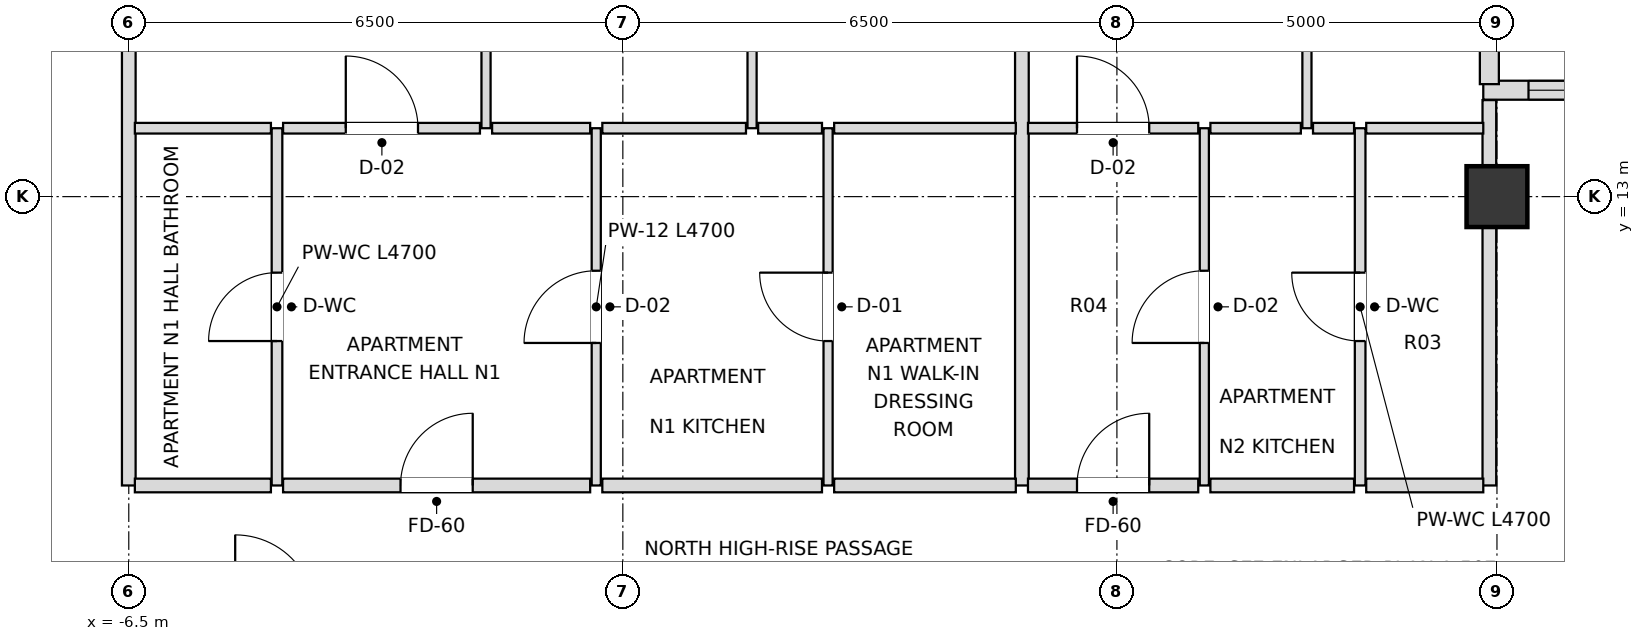
"""IFC4 building model, lengths in metres.
Left out: names, types, materials, properties, quantities, classifications, styles, units other than length and angle.
Written with IfcOpenShell. Run it as: python <this file> out.ifc"""

import sys

from ifc_helpers import new_model, si_unit, direction, frame, frame_2d, origin, origin_2d, place, context, subcontext, project, spatial, rectangle, extrude, element, fill, save


model = new_model("IFC4")
c1 = context("Model", 3, precision=1e-05, world=origin(), true_north=direction((0.0, 1.0)))
c2 = subcontext(c1, "Body", "Model", "MODEL_VIEW")
j1 = project(units=[si_unit("LENGTHUNIT", "METRE"), si_unit("PLANEANGLEUNIT", "RADIAN")], contexts=[c1])
p1 = place(None, origin())
s1 = spatial("IfcSite", under=j1, at=p1, CompositionType="ELEMENT")
p2 = place(p1, origin())
s2 = spatial("IfcBuilding", under=s1, at=p2, CompositionType="ELEMENT")
p3 = place(p2, frame((0.0, 0.0, 279.9)))
s3 = spatial("IfcBuildingStorey", under=s2, at=p3, CompositionType="ELEMENT", Elevation=279.9)
p4 = place(p3, frame((11.5, 13.0, 0.0), z_axis=(0.0, 0.0, 1.0), x_axis=(1.0, 0.0, 0.0)))
e1 = element("IfcColumn", 1, at=p4, inside=s3, PredefinedType="COLUMN", context=c2, shape_type="SweptSolid", body=[
    extrude(rectangle(XDim=0.8, YDim=0.8, at=origin_2d()), origin(), (0.0, 0.0, 1.0), 3.6),
])
p5 = place(p3, frame((16.98, 14.4, 0.0), z_axis=(0.0, 0.0, 1.0), x_axis=(-1.0, 0.0, 0.0)))
e2 = element("IfcWall", 2, at=p5, inside=s3, PredefinedType="SOLIDWALL", context=c2, shape_type="SweptSolid", body=[
    extrude(rectangle(XDim=5.66, YDim=0.25, at=frame_2d((2.83, 0.0))), origin(), (0.0, 0.0, 1.0), 2.748),
])
p6 = place(p5, frame((0.595, 0.0, 0.72)))
e3 = element("IfcOpeningElement", 3, at=p6, cuts=e2, PredefinedType="OPENING", context=c2, shape_type="SweptSolid", body=[
    extrude(rectangle(XDim=1.8, YDim=1.68, at=frame_2d((0.9, 0.84))), frame((0.0, 0.135, 0.0), z_axis=(0.0, -1.0, 0.0), x_axis=(1.0, 0.0, 0.0)), (0.0, 0.0, 1.0), 0.27),
])
p7 = place(p5, frame((3.265, 0.0, 0.72)))
e4 = element("IfcOpeningElement", 4, at=p7, cuts=e2, PredefinedType="OPENING", context=c2, shape_type="SweptSolid", body=[
    extrude(rectangle(XDim=1.8, YDim=1.68, at=frame_2d((0.9, 0.84))), frame((0.0, 0.135, 0.0), z_axis=(0.0, -1.0, 0.0), x_axis=(1.0, 0.0, 0.0)), (0.0, 0.0, 1.0), 0.27),
])
p8 = place(p3, frame((11.4, 14.48, 0.0), z_axis=(0.0, 0.0, 1.0), x_axis=(0.0, 1.0, 0.0)))
e5 = element("IfcWall", 5, at=p8, inside=s3, PredefinedType="SOLIDWALL", context=c2, shape_type="SweptSolid", body=[
    extrude(rectangle(XDim=5.34, YDim=0.25, at=frame_2d((2.67, 0.0))), origin(), (0.0, 0.0, 1.0), 2.748),
])
p9 = place(p8, frame((1.615, 0.0, 0.72)))
e6 = element("IfcOpeningElement", 6, at=p9, cuts=e5, PredefinedType="OPENING", context=c2, shape_type="SweptSolid", body=[
    extrude(rectangle(XDim=1.8, YDim=1.68, at=frame_2d((0.9, 0.84))), frame((0.0, 0.135, 0.0), z_axis=(0.0, -1.0, 0.0), x_axis=(1.0, 0.0, 0.0)), (0.0, 0.0, 1.0), 0.27),
])
p10 = place(p3, frame((-6.5, 9.2, 0.0), z_axis=(0.0, 0.0, 1.0), x_axis=(0.0, 1.0, 0.0)))
e7 = element("IfcWall", 7, at=p10, inside=s3, PredefinedType="PARTITIONING", context=c2, shape_type="SweptSolid", body=[
    extrude(rectangle(XDim=10.7, YDim=0.18, at=frame_2d((5.35, 0.0))), origin(), (0.0, 0.0, 1.0), 2.826),
])
p11 = place(p3, frame((-4.55, 9.2, 0.0), z_axis=(0.0, 0.0, 1.0), x_axis=(0.0, 1.0, 0.0)))
e8 = element("IfcWall", 8, at=p11, inside=s3, PredefinedType="PARTITIONING", context=c2, shape_type="SweptSolid", body=[
    extrude(rectangle(XDim=4.7, YDim=0.14, at=frame_2d((2.35, 0.0))), origin(), (0.0, 0.0, 1.0), 3.38),
])
p12 = place(p11, frame((1.9, 0.0, 0.0)))
e9 = element("IfcOpeningElement", 9, at=p12, cuts=e8, PredefinedType="OPENING", context=c2, shape_type="SweptSolid", body=[
    extrude(rectangle(XDim=0.9, YDim=2.1, at=frame_2d((0.45, 1.05))), frame((0.0, 0.08, 0.0), z_axis=(0.0, -1.0, 0.0), x_axis=(1.0, 0.0, 0.0)), (0.0, 0.0, 1.0), 0.16),
])
p13 = place(p3, frame((-1.8, 13.9, 0.0), z_axis=(0.0, 0.0, 1.0), x_axis=(0.0, 1.0, 0.0)))
e10 = element("IfcWall", 10, at=p13, inside=s3, PredefinedType="PARTITIONING", context=c2, shape_type="SweptSolid", body=[
    extrude(rectangle(XDim=6.0, YDim=0.12, at=frame_2d((3.0, 0.0))), origin(), (0.0, 0.0, 1.0), 3.018),
])
p14 = place(p13, frame((2.55, 0.0, 0.0)))
e11 = element("IfcOpeningElement", 11, at=p14, cuts=e10, PredefinedType="OPENING", context=c2, shape_type="SweptSolid", body=[
    extrude(rectangle(XDim=0.9, YDim=2.1, at=frame_2d((0.45, 1.05))), frame((0.0, 0.07, 0.0), z_axis=(0.0, -1.0, 0.0), x_axis=(1.0, 0.0, 0.0)), (0.0, 0.0, 1.0), 0.14),
])
p15 = place(p3, frame((-0.35, 9.2, 0.0), z_axis=(0.0, 0.0, 1.0), x_axis=(0.0, 1.0, 0.0)))
e12 = element("IfcWall", 12, at=p15, inside=s3, PredefinedType="PARTITIONING", context=c2, shape_type="SweptSolid", body=[
    extrude(rectangle(XDim=4.7, YDim=0.12, at=frame_2d((2.35, 0.0))), origin(), (0.0, 0.0, 1.0), 3.38),
])
p16 = place(p15, frame((1.875, 0.0, 0.0)))
e13 = element("IfcOpeningElement", 13, at=p16, cuts=e12, PredefinedType="OPENING", context=c2, shape_type="SweptSolid", body=[
    extrude(rectangle(XDim=0.95, YDim=2.1, at=frame_2d((0.475, 1.05))), frame((0.0, 0.07, 0.0), z_axis=(0.0, -1.0, 0.0), x_axis=(1.0, 0.0, 0.0)), (0.0, 0.0, 1.0), 0.14),
])
p17 = place(p3, frame((1.7, 13.9, 0.0), z_axis=(0.0, 0.0, 1.0), x_axis=(0.0, 1.0, 0.0)))
e14 = element("IfcWall", 14, at=p17, inside=s3, PredefinedType="PARTITIONING", context=c2, shape_type="SweptSolid", body=[
    extrude(rectangle(XDim=6.0, YDim=0.12, at=frame_2d((3.0, 0.0))), origin(), (0.0, 0.0, 1.0), 3.018),
])
p18 = place(p17, frame((2.55, 0.0, 0.0)))
e15 = element("IfcOpeningElement", 15, at=p18, cuts=e14, PredefinedType="OPENING", context=c2, shape_type="SweptSolid", body=[
    extrude(rectangle(XDim=0.9, YDim=2.1, at=frame_2d((0.45, 1.05))), frame((0.0, 0.07, 0.0), z_axis=(0.0, -1.0, 0.0), x_axis=(1.0, 0.0, 0.0)), (0.0, 0.0, 1.0), 0.14),
])
p19 = place(p3, frame((2.7, 9.2, 0.0), z_axis=(0.0, 0.0, 1.0), x_axis=(0.0, 1.0, 0.0)))
e16 = element("IfcWall", 16, at=p19, inside=s3, PredefinedType="PARTITIONING", context=c2, shape_type="SweptSolid", body=[
    extrude(rectangle(XDim=4.7, YDim=0.12, at=frame_2d((2.35, 0.0))), origin(), (0.0, 0.0, 1.0), 3.38),
])
p20 = place(p19, frame((1.9, 0.0, 0.0)))
e17 = element("IfcOpeningElement", 17, at=p20, cuts=e16, PredefinedType="OPENING", context=c2, shape_type="SweptSolid", body=[
    extrude(rectangle(XDim=0.9, YDim=2.1, at=frame_2d((0.45, 1.05))), frame((0.0, 0.07, 0.0), z_axis=(0.0, -1.0, 0.0), x_axis=(1.0, 0.0, 0.0)), (0.0, 0.0, 1.0), 0.14),
])
p21 = place(p3, frame((5.25, 9.2, 0.0), z_axis=(0.0, 0.0, 1.0), x_axis=(0.0, 1.0, 0.0)))
e18 = element("IfcWall", 18, at=p21, inside=s3, PredefinedType="PARTITIONING", context=c2, shape_type="SweptSolid", body=[
    extrude(rectangle(XDim=10.7, YDim=0.18, at=frame_2d((5.35, 0.0))), origin(), (0.0, 0.0, 1.0), 3.018),
])
p22 = place(p3, frame((7.65, 9.2, 0.0), z_axis=(0.0, 0.0, 1.0), x_axis=(0.0, 1.0, 0.0)))
e19 = element("IfcWall", 19, at=p22, inside=s3, PredefinedType="PARTITIONING", context=c2, shape_type="SweptSolid", body=[
    extrude(rectangle(XDim=4.7, YDim=0.12, at=frame_2d((2.35, 0.0))), origin(), (0.0, 0.0, 1.0), 2.826),
])
p23 = place(p22, frame((1.875, 0.0, 0.0)))
e20 = element("IfcOpeningElement", 20, at=p23, cuts=e19, PredefinedType="OPENING", context=c2, shape_type="SweptSolid", body=[
    extrude(rectangle(XDim=0.95, YDim=2.1, at=frame_2d((0.475, 1.05))), frame((0.0, 0.07, 0.0), z_axis=(0.0, -1.0, 0.0), x_axis=(1.0, 0.0, 0.0)), (0.0, 0.0, 1.0), 0.14),
])
p24 = place(p3, frame((9.0, 13.9, 0.0), z_axis=(0.0, 0.0, 1.0), x_axis=(0.0, 1.0, 0.0)))
e21 = element("IfcWall", 21, at=p24, inside=s3, PredefinedType="PARTITIONING", context=c2, shape_type="SweptSolid", body=[
    extrude(rectangle(XDim=6.0, YDim=0.12, at=frame_2d((3.0, 0.0))), origin(), (0.0, 0.0, 1.0), 3.38),
])
p25 = place(p24, frame((2.55, 0.0, 0.0)))
e22 = element("IfcOpeningElement", 22, at=p25, cuts=e21, PredefinedType="OPENING", context=c2, shape_type="SweptSolid", body=[
    extrude(rectangle(XDim=0.9, YDim=2.1, at=frame_2d((0.45, 1.05))), frame((0.0, 0.07, 0.0), z_axis=(0.0, -1.0, 0.0), x_axis=(1.0, 0.0, 0.0)), (0.0, 0.0, 1.0), 0.14),
])
p26 = place(p3, frame((9.7, 9.2, 0.0), z_axis=(0.0, 0.0, 1.0), x_axis=(0.0, 1.0, 0.0)))
e23 = element("IfcWall", 23, at=p26, inside=s3, PredefinedType="PARTITIONING", context=c2, shape_type="SweptSolid", body=[
    extrude(rectangle(XDim=4.7, YDim=0.14, at=frame_2d((2.35, 0.0))), origin(), (0.0, 0.0, 1.0), 2.826),
])
p27 = place(p26, frame((1.9, 0.0, 0.0)))
e24 = element("IfcOpeningElement", 24, at=p27, cuts=e23, PredefinedType="OPENING", context=c2, shape_type="SweptSolid", body=[
    extrude(rectangle(XDim=0.9, YDim=2.1, at=frame_2d((0.45, 1.05))), frame((0.0, 0.08, 0.0), z_axis=(0.0, -1.0, 0.0), x_axis=(1.0, 0.0, 0.0)), (0.0, 0.0, 1.0), 0.16),
])
p28 = place(p3, frame((11.4, 9.2, 0.0), z_axis=(0.0, 0.0, 1.0), x_axis=(0.0, 1.0, 0.0)))
e25 = element("IfcWall", 25, at=p28, inside=s3, PredefinedType="PARTITIONING", context=c2, shape_type="SweptSolid", body=[
    extrude(rectangle(XDim=5.07, YDim=0.18, at=frame_2d((2.535, 0.0))), origin(), (0.0, 0.0, 1.0), 2.748),
])
p29 = place(p3, frame((-6.42, 9.2, 0.0), z_axis=(0.0, 0.0, 1.0), x_axis=(1.0, 0.0, 0.0)))
e26 = element("IfcWall", 26, at=p29, inside=s3, PredefinedType="PARTITIONING", context=c2, shape_type="SweptSolid", body=[
    extrude(rectangle(XDim=1.79, YDim=0.18, at=frame_2d((0.895, 0.0))), origin(), (0.0, 0.0, 1.0), 3.38),
])
p30 = place(p3, frame((-4.47, 9.2, 0.0), z_axis=(0.0, 0.0, 1.0), x_axis=(1.0, 0.0, 0.0)))
e27 = element("IfcWall", 27, at=p30, inside=s3, PredefinedType="PARTITIONING", context=c2, shape_type="SweptSolid", body=[
    extrude(rectangle(XDim=4.04, YDim=0.18, at=frame_2d((2.02, 0.0))), origin(), (0.0, 0.0, 1.0), 3.38),
])
p31 = place(p30, frame((1.545, 0.0, 0.0)))
e28 = element("IfcOpeningElement", 28, at=p31, cuts=e27, PredefinedType="OPENING", context=c2, shape_type="SweptSolid", body=[
    extrude(rectangle(XDim=0.95, YDim=2.15, at=frame_2d((0.475, 1.075))), frame((0.0, 0.1, 0.0), z_axis=(0.0, -1.0, 0.0), x_axis=(1.0, 0.0, 0.0)), (0.0, 0.0, 1.0), 0.2),
])
p32 = place(p3, frame((-0.27, 9.2, 0.0), z_axis=(0.0, 0.0, 1.0), x_axis=(1.0, 0.0, 0.0)))
e29 = element("IfcWall", 29, at=p32, inside=s3, PredefinedType="PARTITIONING", context=c2, shape_type="SweptSolid", body=[
    extrude(rectangle(XDim=2.89, YDim=0.18, at=frame_2d((1.445, 0.0))), origin(), (0.0, 0.0, 1.0), 3.38),
])
p33 = place(p3, frame((2.78, 9.2, 0.0), z_axis=(0.0, 0.0, 1.0), x_axis=(1.0, 0.0, 0.0)))
e30 = element("IfcWall", 30, at=p33, inside=s3, PredefinedType="PARTITIONING", context=c2, shape_type="SweptSolid", body=[
    extrude(rectangle(XDim=2.39, YDim=0.18, at=frame_2d((1.195, 0.0))), origin(), (0.0, 0.0, 1.0), 3.38),
])
p34 = place(p3, frame((5.33, 9.2, 0.0), z_axis=(0.0, 0.0, 1.0), x_axis=(1.0, 0.0, 0.0)))
e31 = element("IfcWall", 31, at=p34, inside=s3, PredefinedType="PARTITIONING", context=c2, shape_type="SweptSolid", body=[
    extrude(rectangle(XDim=2.24, YDim=0.18, at=frame_2d((1.12, 0.0))), origin(), (0.0, 0.0, 1.0), 2.826),
])
p35 = place(p34, frame((0.645, 0.0, 0.0)))
e32 = element("IfcOpeningElement", 32, at=p35, cuts=e31, PredefinedType="OPENING", context=c2, shape_type="SweptSolid", body=[
    extrude(rectangle(XDim=0.95, YDim=2.15, at=frame_2d((0.475, 1.075))), frame((0.0, 0.1, 0.0), z_axis=(0.0, -1.0, 0.0), x_axis=(1.0, 0.0, 0.0)), (0.0, 0.0, 1.0), 0.2),
])
p36 = place(p3, frame((7.73, 9.2, 0.0), z_axis=(0.0, 0.0, 1.0), x_axis=(1.0, 0.0, 0.0)))
e33 = element("IfcWall", 33, at=p36, inside=s3, PredefinedType="PARTITIONING", context=c2, shape_type="SweptSolid", body=[
    extrude(rectangle(XDim=1.89, YDim=0.18, at=frame_2d((0.945, 0.0))), origin(), (0.0, 0.0, 1.0), 3.38),
])
p37 = place(p3, frame((9.78, 9.2, 0.0), z_axis=(0.0, 0.0, 1.0), x_axis=(1.0, 0.0, 0.0)))
e34 = element("IfcWall", 34, at=p37, inside=s3, PredefinedType="PARTITIONING", context=c2, shape_type="SweptSolid", body=[
    extrude(rectangle(XDim=1.54, YDim=0.18, at=frame_2d((0.77, 0.0))), origin(), (0.0, 0.0, 1.0), 3.38),
])
p38 = place(p3, frame((-6.42, 13.9, 0.0), z_axis=(0.0, 0.0, 1.0), x_axis=(1.0, 0.0, 0.0)))
e35 = element("IfcWall", 35, at=p38, inside=s3, PredefinedType="PARTITIONING", context=c2, shape_type="SweptSolid", body=[
    extrude(rectangle(XDim=1.79, YDim=0.14, at=frame_2d((0.895, 0.0))), origin(), (0.0, 0.0, 1.0), 3.38),
])
p39 = place(p3, frame((-4.47, 13.9, 0.0), z_axis=(0.0, 0.0, 1.0), x_axis=(1.0, 0.0, 0.0)))
e36 = element("IfcWall", 36, at=p39, inside=s3, PredefinedType="PARTITIONING", context=c2, shape_type="SweptSolid", body=[
    extrude(rectangle(XDim=2.59, YDim=0.14, at=frame_2d((1.295, 0.0))), origin(), (0.0, 0.0, 1.0), 3.38),
])
p40 = place(p39, frame((0.825, 0.0, 0.0)))
e37 = element("IfcOpeningElement", 37, at=p40, cuts=e36, PredefinedType="OPENING", context=c2, shape_type="SweptSolid", body=[
    extrude(rectangle(XDim=0.95, YDim=2.1, at=frame_2d((0.475, 1.05))), frame((0.0, 0.08, 0.0), z_axis=(0.0, -1.0, 0.0), x_axis=(1.0, 0.0, 0.0)), (0.0, 0.0, 1.0), 0.16),
])
p41 = place(p3, frame((-1.72, 13.9, 0.0), z_axis=(0.0, 0.0, 1.0), x_axis=(1.0, 0.0, 0.0)))
e38 = element("IfcWall", 38, at=p41, inside=s3, PredefinedType="PARTITIONING", context=c2, shape_type="SweptSolid", body=[
    extrude(rectangle(XDim=1.29, YDim=0.14, at=frame_2d((0.645, 0.0))), origin(), (0.0, 0.0, 1.0), 3.38),
])
p42 = place(p3, frame((-0.27, 13.9, 0.0), z_axis=(0.0, 0.0, 1.0), x_axis=(1.0, 0.0, 0.0)))
e39 = element("IfcWall", 39, at=p42, inside=s3, PredefinedType="PARTITIONING", context=c2, shape_type="SweptSolid", body=[
    extrude(rectangle(XDim=1.89, YDim=0.14, at=frame_2d((0.945, 0.0))), origin(), (0.0, 0.0, 1.0), 3.38),
])
p43 = place(p3, frame((1.78, 13.9, 0.0), z_axis=(0.0, 0.0, 1.0), x_axis=(1.0, 0.0, 0.0)))
e40 = element("IfcWall", 40, at=p43, inside=s3, PredefinedType="PARTITIONING", context=c2, shape_type="SweptSolid", body=[
    extrude(rectangle(XDim=0.84, YDim=0.14, at=frame_2d((0.42, 0.0))), origin(), (0.0, 0.0, 1.0), 3.38),
])
p44 = place(p3, frame((2.78, 13.9, 0.0), z_axis=(0.0, 0.0, 1.0), x_axis=(1.0, 0.0, 0.0)))
e41 = element("IfcWall", 41, at=p44, inside=s3, PredefinedType="PARTITIONING", context=c2, shape_type="SweptSolid", body=[
    extrude(rectangle(XDim=2.39, YDim=0.14, at=frame_2d((1.195, 0.0))), origin(), (0.0, 0.0, 1.0), 3.38),
])
p45 = place(p3, frame((5.33, 13.9, 0.0), z_axis=(0.0, 0.0, 1.0), x_axis=(1.0, 0.0, 0.0)))
e42 = element("IfcWall", 42, at=p45, inside=s3, PredefinedType="PARTITIONING", context=c2, shape_type="SweptSolid", body=[
    extrude(rectangle(XDim=2.24, YDim=0.14, at=frame_2d((1.12, 0.0))), origin(), (0.0, 0.0, 1.0), 2.826),
])
p46 = place(p45, frame((0.645, 0.0, 0.0)))
e43 = element("IfcOpeningElement", 43, at=p46, cuts=e42, PredefinedType="OPENING", context=c2, shape_type="SweptSolid", body=[
    extrude(rectangle(XDim=0.95, YDim=2.1, at=frame_2d((0.475, 1.05))), frame((0.0, 0.08, 0.0), z_axis=(0.0, -1.0, 0.0), x_axis=(1.0, 0.0, 0.0)), (0.0, 0.0, 1.0), 0.16),
])
p47 = place(p3, frame((7.73, 13.9, 0.0), z_axis=(0.0, 0.0, 1.0), x_axis=(1.0, 0.0, 0.0)))
e44 = element("IfcWall", 44, at=p47, inside=s3, PredefinedType="PARTITIONING", context=c2, shape_type="SweptSolid", body=[
    extrude(rectangle(XDim=1.19, YDim=0.14, at=frame_2d((0.595, 0.0))), origin(), (0.0, 0.0, 1.0), 3.38),
])
p48 = place(p3, frame((9.08, 13.9, 0.0), z_axis=(0.0, 0.0, 1.0), x_axis=(1.0, 0.0, 0.0)))
e45 = element("IfcWall", 45, at=p48, inside=s3, PredefinedType="PARTITIONING", context=c2, shape_type="SweptSolid", body=[
    extrude(rectangle(XDim=0.54, YDim=0.14, at=frame_2d((0.27, 0.0))), origin(), (0.0, 0.0, 1.0), 3.38),
])
p49 = place(p3, frame((9.78, 13.9, 0.0), z_axis=(0.0, 0.0, 1.0), x_axis=(1.0, 0.0, 0.0)))
e46 = element("IfcWall", 46, at=p49, inside=s3, PredefinedType="PARTITIONING", context=c2, shape_type="SweptSolid", body=[
    extrude(rectangle(XDim=1.54, YDim=0.14, at=frame_2d((0.77, 0.0))), origin(), (0.0, 0.0, 1.0), 3.38),
])
p50 = place(p7, origin())
e47 = element("IfcWindow", 47, at=p50, inside=s3, PartitioningType="SINGLE_PANEL", PredefinedType="WINDOW", context=c2, shape_type="SweptSolid", body=[
    extrude(rectangle(XDim=1.8, YDim=1.68, at=frame_2d((0.9, 0.84))), frame((0.0, 0.03, 0.0), z_axis=(0.0, -1.0, 0.0), x_axis=(1.0, 0.0, 0.0)), (0.0, 0.0, 1.0), 0.06),
])
fill(e4, e47)
p51 = place(p12, origin())
e48 = element("IfcDoor", 48, at=p51, inside=s3, OperationType="SINGLE_SWING_LEFT", PredefinedType="DOOR", context=c2, shape_type="SweptSolid", body=[
    extrude(rectangle(XDim=0.9, YDim=2.1, at=frame_2d((0.45, 1.05))), frame((0.0, 0.025, 0.0), z_axis=(0.0, -1.0, 0.0), x_axis=(1.0, 0.0, 0.0)), (0.0, 0.0, 1.0), 0.05),
])
fill(e9, e48)
p52 = place(p31, origin())
e49 = element("IfcDoor", 49, at=p52, inside=s3, OperationType="SINGLE_SWING_RIGHT", PredefinedType="DOOR", context=c2, shape_type="SweptSolid", body=[
    extrude(rectangle(XDim=0.95, YDim=2.15, at=frame_2d((0.475, 1.075))), frame((0.0, 0.025, 0.0), z_axis=(0.0, -1.0, 0.0), x_axis=(1.0, 0.0, 0.0)), (0.0, 0.0, 1.0), 0.05),
])
fill(e28, e49)
p53 = place(p16, origin())
e50 = element("IfcDoor", 50, at=p53, inside=s3, OperationType="SINGLE_SWING_LEFT", PredefinedType="DOOR", context=c2, shape_type="SweptSolid", body=[
    extrude(rectangle(XDim=0.95, YDim=2.1, at=frame_2d((0.475, 1.05))), frame((0.0, 0.025, 0.0), z_axis=(0.0, -1.0, 0.0), x_axis=(1.0, 0.0, 0.0)), (0.0, 0.0, 1.0), 0.05),
])
fill(e13, e50)
p54 = place(p20, origin())
e51 = element("IfcDoor", 51, at=p54, inside=s3, OperationType="SINGLE_SWING_RIGHT", PredefinedType="DOOR", context=c2, shape_type="SweptSolid", body=[
    extrude(rectangle(XDim=0.9, YDim=2.1, at=frame_2d((0.45, 1.05))), frame((0.0, 0.025, 0.0), z_axis=(0.0, -1.0, 0.0), x_axis=(1.0, 0.0, 0.0)), (0.0, 0.0, 1.0), 0.05),
])
fill(e17, e51)
p55 = place(p40, origin())
e52 = element("IfcDoor", 52, at=p55, inside=s3, OperationType="SINGLE_SWING_LEFT", PredefinedType="DOOR", context=c2, shape_type="SweptSolid", body=[
    extrude(rectangle(XDim=0.95, YDim=2.1, at=frame_2d((0.475, 1.05))), frame((0.0, 0.025, 0.0), z_axis=(0.0, -1.0, 0.0), x_axis=(1.0, 0.0, 0.0)), (0.0, 0.0, 1.0), 0.05),
])
fill(e37, e52)
p56 = place(p35, origin())
e53 = element("IfcDoor", 53, at=p56, inside=s3, OperationType="SINGLE_SWING_RIGHT", PredefinedType="DOOR", context=c2, shape_type="SweptSolid", body=[
    extrude(rectangle(XDim=0.95, YDim=2.15, at=frame_2d((0.475, 1.075))), frame((0.0, 0.025, 0.0), z_axis=(0.0, -1.0, 0.0), x_axis=(1.0, 0.0, 0.0)), (0.0, 0.0, 1.0), 0.05),
])
fill(e32, e53)
p57 = place(p23, origin())
e54 = element("IfcDoor", 54, at=p57, inside=s3, OperationType="SINGLE_SWING_LEFT", PredefinedType="DOOR", context=c2, shape_type="SweptSolid", body=[
    extrude(rectangle(XDim=0.95, YDim=2.1, at=frame_2d((0.475, 1.05))), frame((0.0, 0.025, 0.0), z_axis=(0.0, -1.0, 0.0), x_axis=(1.0, 0.0, 0.0)), (0.0, 0.0, 1.0), 0.05),
])
fill(e20, e54)
p58 = place(p27, origin())
e55 = element("IfcDoor", 55, at=p58, inside=s3, OperationType="SINGLE_SWING_RIGHT", PredefinedType="DOOR", context=c2, shape_type="SweptSolid", body=[
    extrude(rectangle(XDim=0.9, YDim=2.1, at=frame_2d((0.45, 1.05))), frame((0.0, 0.025, 0.0), z_axis=(0.0, -1.0, 0.0), x_axis=(1.0, 0.0, 0.0)), (0.0, 0.0, 1.0), 0.05),
])
fill(e24, e55)
p59 = place(p46, origin())
e56 = element("IfcDoor", 56, at=p59, inside=s3, OperationType="SINGLE_SWING_LEFT", PredefinedType="DOOR", context=c2, shape_type="SweptSolid", body=[
    extrude(rectangle(XDim=0.95, YDim=2.1, at=frame_2d((0.475, 1.05))), frame((0.0, 0.025, 0.0), z_axis=(0.0, -1.0, 0.0), x_axis=(1.0, 0.0, 0.0)), (0.0, 0.0, 1.0), 0.05),
])
fill(e43, e56)
save(model, sys.argv[1])
